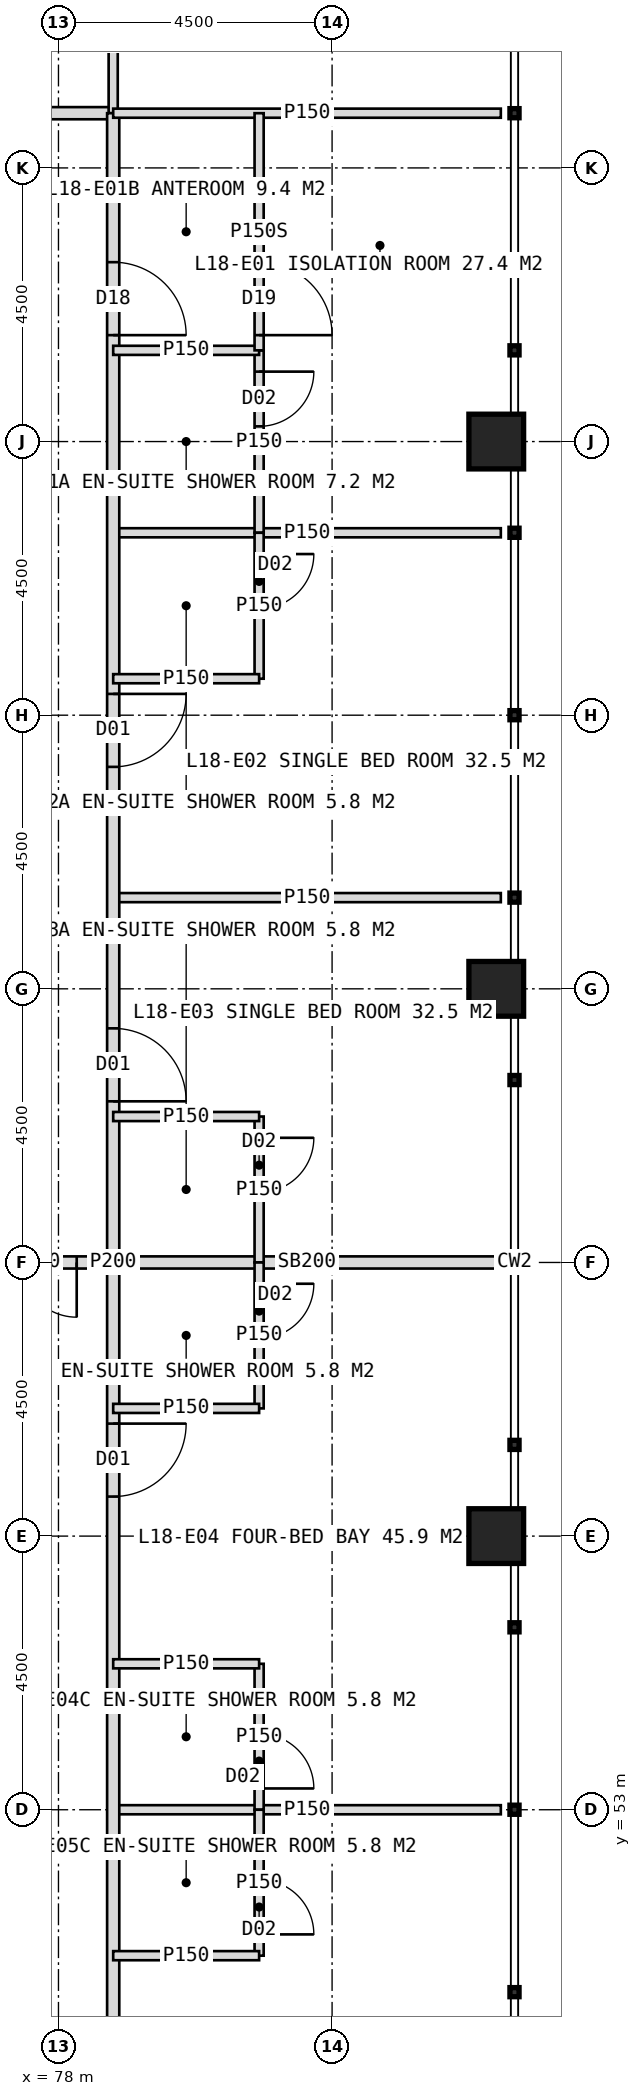
"""IFC4 building model, lengths in metres.
Left out: names, types, materials, properties, quantities, classifications, styles, units other than length and angle.
Written with IfcOpenShell. Run it as: python <this file> out.ifc"""

import sys

from ifc_helpers import new_model, si_unit, direction, frame, frame_2d, origin, origin_2d, place, context, subcontext, project, spatial, rectangle, hollow_rectangle, extrude, element, fill, save


model = new_model("IFC4")
c1 = context("Model", 3, precision=1e-05, world=origin(), true_north=direction((0.0, 1.0)))
c2 = subcontext(c1, "Body", "Model", "MODEL_VIEW")
j1 = project(units=[si_unit("LENGTHUNIT", "METRE"), si_unit("PLANEANGLEUNIT", "RADIAN")], contexts=[c1])
p1 = place(None, origin())
s1 = spatial("IfcSite", under=j1, at=p1, CompositionType="ELEMENT")
p2 = place(p1, origin())
s2 = spatial("IfcBuilding", under=s1, at=p2, CompositionType="ELEMENT")
p3 = place(p2, frame((0.0, 0.0, 79.0)))
s3 = spatial("IfcBuildingStorey", under=s2, at=p3, CompositionType="ELEMENT", Elevation=79.0)
for number, where, z_axis, x_axis in (
    (1, (85.2, 57.5, 0.0), (0.0, 0.0, 1.0), (1.0, 0.0, 0.0)),
    (2, (85.2, 66.5, 0.0), (0.0, 0.0, 1.0), (1.0, 0.0, 0.0)),
    (3, (85.2, 75.5, 0.0), (0.0, 0.0, 1.0), (1.0, 0.0, 0.0)),
):
    element("IfcColumn", number, at=place(p3, frame(where, z_axis=z_axis, x_axis=x_axis)), inside=s3, PredefinedType="COLUMN", context=c2, shape_type="SweptSolid", body=[
        extrude(hollow_rectangle(XDim=0.9, YDim=0.9, WallThickness=0.08, at=origin_2d()), origin(), (0.0, 0.0, 1.0), 4.0),
    ])
p4 = place(p3, frame((41.1, 80.9, 0.0), z_axis=(0.0, 0.0, 1.0), x_axis=(1.0, 0.0, 0.0)))
e4 = element("IfcWall", 4, at=p4, inside=s3, PredefinedType="PARTITIONING", context=c2, shape_type="SweptSolid", body=[
    extrude(rectangle(XDim=37.8, YDim=0.2, at=frame_2d((18.9, 0.0))), origin(), (0.0, 0.0, 1.0), 3.75),
])
p5 = place(p4, frame((5.85, 0.0, 0.0)))
e5 = element("IfcOpeningElement", 5, at=p5, cuts=e4, PredefinedType="OPENING", context=c2, shape_type="SweptSolid", body=[
    extrude(rectangle(XDim=1.2, YDim=2.2, at=frame_2d((0.6, 1.1))), frame((0.0, 0.11, 0.0), z_axis=(0.0, -1.0, 0.0), x_axis=(1.0, 0.0, 0.0)), (0.0, 0.0, 1.0), 0.22),
])
p6 = place(p4, frame((18.3, 0.0, 0.0)))
e6 = element("IfcOpeningElement", 6, at=p6, cuts=e4, PredefinedType="OPENING", context=c2, shape_type="SweptSolid", body=[
    extrude(rectangle(XDim=1.2, YDim=2.2, at=frame_2d((0.6, 1.1))), frame((0.0, 0.11, 0.0), z_axis=(0.0, -1.0, 0.0), x_axis=(1.0, 0.0, 0.0)), (0.0, 0.0, 1.0), 0.22),
])
p7 = place(p4, frame((33.95, 0.0, 0.0)))
e7 = element("IfcOpeningElement", 7, at=p7, cuts=e4, PredefinedType="OPENING", context=c2, shape_type="SweptSolid", body=[
    extrude(rectangle(XDim=1.2, YDim=2.2, at=frame_2d((0.6, 1.1))), frame((0.0, 0.11, 0.0), z_axis=(0.0, -1.0, 0.0), x_axis=(1.0, 0.0, 0.0)), (0.0, 0.0, 1.0), 0.22),
])
p8 = place(p3, frame((78.9, 80.9, 0.0), z_axis=(0.0, 0.0, 1.0), x_axis=(0.0, 1.0, 0.0)))
e8 = element("IfcWall", 8, at=p8, inside=s3, PredefinedType="PARTITIONING", context=c2, shape_type="SweptSolid", body=[
    extrude(rectangle(XDim=2.4, YDim=0.15, at=frame_2d((1.2, 0.0))), origin(), (0.0, 0.0, 1.0), 3.75),
])
for number, where, z_axis, x_axis in (
    (9, (78.9, 74.0, 0.0), (0.0, 0.0, 1.0), (1.0, 0.0, 0.0)),
    (10, (78.9, 68.0, 0.0), (0.0, 0.0, 1.0), (1.0, 0.0, 0.0)),
):
    element("IfcWall", number, at=place(p3, frame(where, z_axis=z_axis, x_axis=x_axis)), inside=s3, PredefinedType="PARTITIONING", context=c2, shape_type="SweptSolid", body=[
        extrude(rectangle(XDim=6.375, YDim=0.15, at=frame_2d((3.188, 0.0))), origin(), (0.0, 0.0, 1.0), 3.75),
    ])
p9 = place(p3, frame((78.9, 62.0, 0.0), z_axis=(0.0, 0.0, 1.0), x_axis=(1.0, 0.0, 0.0)))
e11 = element("IfcWall", 11, at=p9, inside=s3, PredefinedType="SOLIDWALL", context=c2, shape_type="SweptSolid", body=[
    extrude(rectangle(XDim=6.375, YDim=0.2, at=frame_2d((3.188, 0.0))), origin(), (0.0, 0.0, 1.0), 2.75),
])
p10 = place(p3, frame((78.9, 53.0, 0.0), z_axis=(0.0, 0.0, 1.0), x_axis=(1.0, 0.0, 0.0)))
e12 = element("IfcWall", 12, at=p10, inside=s3, PredefinedType="PARTITIONING", context=c2, shape_type="SweptSolid", body=[
    extrude(rectangle(XDim=6.375, YDim=0.15, at=frame_2d((3.188, 0.0))), origin(), (0.0, 0.0, 1.0), 3.75),
])
p11 = place(p3, frame((78.9, 80.9, 0.0), z_axis=(0.0, 0.0, 1.0), x_axis=(0.0, -1.0, 0.0)))
e13 = element("IfcWall", 13, at=p11, inside=s3, PredefinedType="PARTITIONING", context=c2, shape_type="SweptSolid", body=[
    extrude(rectangle(XDim=37.8, YDim=0.2, at=frame_2d((18.9, 0.0))), origin(), (0.0, 0.0, 1.0), 3.75),
])
p12 = place(p11, frame((2.45, 0.0, 0.0)))
e14 = element("IfcOpeningElement", 14, at=p12, cuts=e13, PredefinedType="OPENING", context=c2, shape_type="SweptSolid", body=[
    extrude(rectangle(XDim=1.2, YDim=2.2, at=frame_2d((0.6, 1.1))), frame((0.0, 0.11, 0.0), z_axis=(0.0, -1.0, 0.0), x_axis=(1.0, 0.0, 0.0)), (0.0, 0.0, 1.0), 0.22),
])
p13 = place(p11, frame((9.55, 0.0, 0.0)))
e15 = element("IfcOpeningElement", 15, at=p13, cuts=e13, PredefinedType="OPENING", context=c2, shape_type="SweptSolid", body=[
    extrude(rectangle(XDim=1.2, YDim=2.2, at=frame_2d((0.6, 1.1))), frame((0.0, 0.11, 0.0), z_axis=(0.0, -1.0, 0.0), x_axis=(1.0, 0.0, 0.0)), (0.0, 0.0, 1.0), 0.22),
])
p14 = place(p11, frame((15.05, 0.0, 0.0)))
e16 = element("IfcOpeningElement", 16, at=p14, cuts=e13, PredefinedType="OPENING", context=c2, shape_type="SweptSolid", body=[
    extrude(rectangle(XDim=1.2, YDim=2.2, at=frame_2d((0.6, 1.1))), frame((0.0, 0.11, 0.0), z_axis=(0.0, -1.0, 0.0), x_axis=(1.0, 0.0, 0.0)), (0.0, 0.0, 1.0), 0.22),
])
p15 = place(p11, frame((21.55, 0.0, 0.0)))
e17 = element("IfcOpeningElement", 17, at=p15, cuts=e13, PredefinedType="OPENING", context=c2, shape_type="SweptSolid", body=[
    extrude(rectangle(XDim=1.2, YDim=2.2, at=frame_2d((0.6, 1.1))), frame((0.0, 0.11, 0.0), z_axis=(0.0, -1.0, 0.0), x_axis=(1.0, 0.0, 0.0)), (0.0, 0.0, 1.0), 0.22),
])
p16 = place(p11, frame((33.95, 0.0, 0.0)))
e18 = element("IfcOpeningElement", 18, at=p16, cuts=e13, PredefinedType="OPENING", context=c2, shape_type="SweptSolid", body=[
    extrude(rectangle(XDim=1.2, YDim=2.2, at=frame_2d((0.6, 1.1))), frame((0.0, 0.11, 0.0), z_axis=(0.0, -1.0, 0.0), x_axis=(1.0, 0.0, 0.0)), (0.0, 0.0, 1.0), 0.22),
])
p17 = place(p3, frame((78.9, 80.9, 0.0), z_axis=(0.0, 0.0, 1.0), x_axis=(1.0, 0.0, 0.0)))
e19 = element("IfcWall", 19, at=p17, inside=s3, PredefinedType="PARTITIONING", context=c2, shape_type="SweptSolid", body=[
    extrude(rectangle(XDim=6.375, YDim=0.15, at=frame_2d((3.188, 0.0))), origin(), (0.0, 0.0, 1.0), 3.75),
])
p18 = place(p3, frame((81.3, 77.0, 0.0), z_axis=(0.0, 0.0, 1.0), x_axis=(0.0, -1.0, 0.0)))
e20 = element("IfcWall", 20, at=p18, inside=s3, PredefinedType="PARTITIONING", context=c2, shape_type="SweptSolid", body=[
    extrude(rectangle(XDim=3.0, YDim=0.15, at=frame_2d((1.5, 0.0))), origin(), (0.0, 0.0, 1.0), 3.75),
])
p19 = place(p18, frame((0.35, 0.0, 0.0)))
e21 = element("IfcOpeningElement", 21, at=p19, cuts=e20, PredefinedType="OPENING", context=c2, shape_type="SweptSolid", body=[
    extrude(rectangle(XDim=0.9, YDim=2.1, at=frame_2d((0.45, 1.05))), frame((0.0, 0.085, 0.0), z_axis=(0.0, -1.0, 0.0), x_axis=(1.0, 0.0, 0.0)), (0.0, 0.0, 1.0), 0.17),
])
p20 = place(p3, frame((78.9, 77.0, 0.0), z_axis=(0.0, 0.0, 1.0), x_axis=(1.0, 0.0, 0.0)))
e22 = element("IfcWall", 22, at=p20, inside=s3, PredefinedType="PARTITIONING", context=c2, shape_type="SweptSolid", body=[
    extrude(rectangle(XDim=2.4, YDim=0.15, at=frame_2d((1.2, 0.0))), origin(), (0.0, 0.0, 1.0), 3.75),
])
p21 = place(p3, frame((81.3, 80.9, 0.0), z_axis=(0.0, 0.0, 1.0), x_axis=(0.0, -1.0, 0.0)))
e23 = element("IfcWall", 23, at=p21, inside=s3, PredefinedType="PARTITIONING", context=c2, shape_type="SweptSolid", body=[
    extrude(rectangle(XDim=3.9, YDim=0.15, at=frame_2d((1.95, 0.0))), origin(), (0.0, 0.0, 1.0), 3.75),
])
p22 = place(p21, frame((2.45, 0.0, 0.0)))
e24 = element("IfcOpeningElement", 24, at=p22, cuts=e23, PredefinedType="OPENING", context=c2, shape_type="SweptSolid", body=[
    extrude(rectangle(XDim=1.2, YDim=2.2, at=frame_2d((0.6, 1.1))), frame((0.0, 0.085, 0.0), z_axis=(0.0, -1.0, 0.0), x_axis=(1.0, 0.0, 0.0)), (0.0, 0.0, 1.0), 0.17),
])
p23 = place(p3, frame((81.3, 74.0, 0.0), z_axis=(0.0, 0.0, 1.0), x_axis=(0.0, -1.0, 0.0)))
e25 = element("IfcWall", 25, at=p23, inside=s3, PredefinedType="PARTITIONING", context=c2, shape_type="SweptSolid", body=[
    extrude(rectangle(XDim=2.4, YDim=0.15, at=frame_2d((1.2, 0.0))), origin(), (0.0, 0.0, 1.0), 3.75),
])
p24 = place(p23, frame((0.35, 0.0, 0.0)))
e26 = element("IfcOpeningElement", 26, at=p24, cuts=e25, PredefinedType="OPENING", context=c2, shape_type="SweptSolid", body=[
    extrude(rectangle(XDim=0.9, YDim=2.1, at=frame_2d((0.45, 1.05))), frame((0.0, 0.085, 0.0), z_axis=(0.0, -1.0, 0.0), x_axis=(1.0, 0.0, 0.0)), (0.0, 0.0, 1.0), 0.17),
])
p25 = place(p3, frame((78.9, 71.6, 0.0), z_axis=(0.0, 0.0, 1.0), x_axis=(1.0, 0.0, 0.0)))
e27 = element("IfcWall", 27, at=p25, inside=s3, PredefinedType="PARTITIONING", context=c2, shape_type="SweptSolid", body=[
    extrude(rectangle(XDim=2.4, YDim=0.15, at=frame_2d((1.2, 0.0))), origin(), (0.0, 0.0, 1.0), 3.75),
])
p26 = place(p3, frame((81.3, 64.4, 0.0), z_axis=(0.0, 0.0, 1.0), x_axis=(0.0, -1.0, 0.0)))
e28 = element("IfcWall", 28, at=p26, inside=s3, PredefinedType="PARTITIONING", context=c2, shape_type="SweptSolid", body=[
    extrude(rectangle(XDim=2.4, YDim=0.15, at=frame_2d((1.2, 0.0))), origin(), (0.0, 0.0, 1.0), 3.75),
])
p27 = place(p26, frame((0.35, 0.0, 0.0)))
e29 = element("IfcOpeningElement", 29, at=p27, cuts=e28, PredefinedType="OPENING", context=c2, shape_type="SweptSolid", body=[
    extrude(rectangle(XDim=0.9, YDim=2.1, at=frame_2d((0.45, 1.05))), frame((0.0, 0.085, 0.0), z_axis=(0.0, -1.0, 0.0), x_axis=(1.0, 0.0, 0.0)), (0.0, 0.0, 1.0), 0.17),
])
p28 = place(p3, frame((78.9, 64.4, 0.0), z_axis=(0.0, 0.0, 1.0), x_axis=(1.0, 0.0, 0.0)))
e30 = element("IfcWall", 30, at=p28, inside=s3, PredefinedType="PARTITIONING", context=c2, shape_type="SweptSolid", body=[
    extrude(rectangle(XDim=2.4, YDim=0.15, at=frame_2d((1.2, 0.0))), origin(), (0.0, 0.0, 1.0), 3.75),
])
p29 = place(p3, frame((81.3, 62.0, 0.0), z_axis=(0.0, 0.0, 1.0), x_axis=(0.0, -1.0, 0.0)))
e31 = element("IfcWall", 31, at=p29, inside=s3, PredefinedType="PARTITIONING", context=c2, shape_type="SweptSolid", body=[
    extrude(rectangle(XDim=2.4, YDim=0.15, at=frame_2d((1.2, 0.0))), origin(), (0.0, 0.0, 1.0), 3.75),
])
p30 = place(p29, frame((0.35, 0.0, 0.0)))
e32 = element("IfcOpeningElement", 32, at=p30, cuts=e31, PredefinedType="OPENING", context=c2, shape_type="SweptSolid", body=[
    extrude(rectangle(XDim=0.9, YDim=2.1, at=frame_2d((0.45, 1.05))), frame((0.0, 0.085, 0.0), z_axis=(0.0, -1.0, 0.0), x_axis=(1.0, 0.0, 0.0)), (0.0, 0.0, 1.0), 0.17),
])
p31 = place(p3, frame((78.9, 59.6, 0.0), z_axis=(0.0, 0.0, 1.0), x_axis=(1.0, 0.0, 0.0)))
e33 = element("IfcWall", 33, at=p31, inside=s3, PredefinedType="PARTITIONING", context=c2, shape_type="SweptSolid", body=[
    extrude(rectangle(XDim=2.4, YDim=0.15, at=frame_2d((1.2, 0.0))), origin(), (0.0, 0.0, 1.0), 3.75),
])
p32 = place(p3, frame((81.3, 55.4, 0.0), z_axis=(0.0, 0.0, 1.0), x_axis=(0.0, -1.0, 0.0)))
e34 = element("IfcWall", 34, at=p32, inside=s3, PredefinedType="PARTITIONING", context=c2, shape_type="SweptSolid", body=[
    extrude(rectangle(XDim=2.4, YDim=0.15, at=frame_2d((1.2, 0.0))), origin(), (0.0, 0.0, 1.0), 3.75),
])
p33 = place(p32, frame((1.15, 0.0, 0.0)))
e35 = element("IfcOpeningElement", 35, at=p33, cuts=e34, PredefinedType="OPENING", context=c2, shape_type="SweptSolid", body=[
    extrude(rectangle(XDim=0.9, YDim=2.1, at=frame_2d((0.45, 1.05))), frame((0.0, 0.085, 0.0), z_axis=(0.0, -1.0, 0.0), x_axis=(1.0, 0.0, 0.0)), (0.0, 0.0, 1.0), 0.17),
])
p34 = place(p3, frame((78.9, 55.4, 0.0), z_axis=(0.0, 0.0, 1.0), x_axis=(1.0, 0.0, 0.0)))
e36 = element("IfcWall", 36, at=p34, inside=s3, PredefinedType="PARTITIONING", context=c2, shape_type="SweptSolid", body=[
    extrude(rectangle(XDim=2.4, YDim=0.15, at=frame_2d((1.2, 0.0))), origin(), (0.0, 0.0, 1.0), 3.75),
])
p35 = place(p3, frame((81.3, 53.0, 0.0), z_axis=(0.0, 0.0, 1.0), x_axis=(0.0, -1.0, 0.0)))
e37 = element("IfcWall", 37, at=p35, inside=s3, PredefinedType="PARTITIONING", context=c2, shape_type="SweptSolid", body=[
    extrude(rectangle(XDim=2.4, YDim=0.15, at=frame_2d((1.2, 0.0))), origin(), (0.0, 0.0, 1.0), 3.75),
])
p36 = place(p35, frame((1.15, 0.0, 0.0)))
e38 = element("IfcOpeningElement", 38, at=p36, cuts=e37, PredefinedType="OPENING", context=c2, shape_type="SweptSolid", body=[
    extrude(rectangle(XDim=0.9, YDim=2.1, at=frame_2d((0.45, 1.05))), frame((0.0, 0.085, 0.0), z_axis=(0.0, -1.0, 0.0), x_axis=(1.0, 0.0, 0.0)), (0.0, 0.0, 1.0), 0.17),
])
p37 = place(p3, frame((78.9, 50.6, 0.0), z_axis=(0.0, 0.0, 1.0), x_axis=(1.0, 0.0, 0.0)))
e39 = element("IfcWall", 39, at=p37, inside=s3, PredefinedType="PARTITIONING", context=c2, shape_type="SweptSolid", body=[
    extrude(rectangle(XDim=2.4, YDim=0.15, at=frame_2d((1.2, 0.0))), origin(), (0.0, 0.0, 1.0), 3.75),
])
p38 = place(p3, frame((76.2, 62.0, 0.0), z_axis=(0.0, 0.0, 1.0), x_axis=(1.0, 0.0, 0.0)))
e40 = element("IfcWall", 40, at=p38, inside=s3, PredefinedType="SOLIDWALL", context=c2, shape_type="SweptSolid", body=[
    extrude(rectangle(XDim=2.7, YDim=0.2, at=frame_2d((1.35, 0.0))), origin(), (0.0, 0.0, 1.0), 2.75),
])
p39 = place(p38, frame((0.3, 0.0, 0.0)))
e41 = element("IfcOpeningElement", 41, at=p39, cuts=e40, PredefinedType="OPENING", context=c2, shape_type="SweptSolid", body=[
    extrude(rectangle(XDim=1.8, YDim=2.2, at=frame_2d((0.9, 1.1))), frame((0.0, 0.11, 0.0), z_axis=(0.0, -1.0, 0.0), x_axis=(1.0, 0.0, 0.0)), (0.0, 0.0, 1.0), 0.22),
])
p40 = place(p22, origin())
e42 = element("IfcDoor", 42, at=p40, inside=s3, OperationType="SINGLE_SWING_RIGHT", PredefinedType="DOOR", context=c2, shape_type="SweptSolid", body=[
    extrude(rectangle(XDim=1.2, YDim=2.2, at=frame_2d((0.6, 1.1))), frame((0.0, 0.025, 0.0), z_axis=(0.0, -1.0, 0.0), x_axis=(1.0, 0.0, 0.0)), (0.0, 0.0, 1.0), 0.05),
])
fill(e24, e42)
p41 = place(p12, origin())
e43 = element("IfcDoor", 43, at=p41, inside=s3, OperationType="SINGLE_SWING_RIGHT", PredefinedType="DOOR", context=c2, shape_type="SweptSolid", body=[
    extrude(rectangle(XDim=1.2, YDim=2.2, at=frame_2d((0.6, 1.1))), frame((0.0, 0.025, 0.0), z_axis=(0.0, -1.0, 0.0), x_axis=(1.0, 0.0, 0.0)), (0.0, 0.0, 1.0), 0.05),
])
fill(e14, e43)
p42 = place(p19, origin())
e44 = element("IfcDoor", 44, at=p42, inside=s3, OperationType="SINGLE_SWING_LEFT", PredefinedType="DOOR", context=c2, shape_type="SweptSolid", body=[
    extrude(rectangle(XDim=0.9, YDim=2.1, at=frame_2d((0.45, 1.05))), frame((0.0, 0.025, 0.0), z_axis=(0.0, -1.0, 0.0), x_axis=(1.0, 0.0, 0.0)), (0.0, 0.0, 1.0), 0.05),
])
fill(e21, e44)
p43 = place(p13, origin())
e45 = element("IfcDoor", 45, at=p43, inside=s3, OperationType="SINGLE_SWING_LEFT", PredefinedType="DOOR", context=c2, shape_type="SweptSolid", body=[
    extrude(rectangle(XDim=1.2, YDim=2.2, at=frame_2d((0.6, 1.1))), frame((0.0, 0.025, 0.0), z_axis=(0.0, -1.0, 0.0), x_axis=(1.0, 0.0, 0.0)), (0.0, 0.0, 1.0), 0.05),
])
fill(e15, e45)
p44 = place(p24, origin())
e46 = element("IfcDoor", 46, at=p44, inside=s3, OperationType="SINGLE_SWING_LEFT", PredefinedType="DOOR", context=c2, shape_type="SweptSolid", body=[
    extrude(rectangle(XDim=0.9, YDim=2.1, at=frame_2d((0.45, 1.05))), frame((0.0, 0.025, 0.0), z_axis=(0.0, -1.0, 0.0), x_axis=(1.0, 0.0, 0.0)), (0.0, 0.0, 1.0), 0.05),
])
fill(e26, e46)
p45 = place(p14, origin())
e47 = element("IfcDoor", 47, at=p45, inside=s3, OperationType="SINGLE_SWING_RIGHT", PredefinedType="DOOR", context=c2, shape_type="SweptSolid", body=[
    extrude(rectangle(XDim=1.2, YDim=2.2, at=frame_2d((0.6, 1.1))), frame((0.0, 0.025, 0.0), z_axis=(0.0, -1.0, 0.0), x_axis=(1.0, 0.0, 0.0)), (0.0, 0.0, 1.0), 0.05),
])
fill(e16, e47)
p46 = place(p27, origin())
e48 = element("IfcDoor", 48, at=p46, inside=s3, OperationType="SINGLE_SWING_LEFT", PredefinedType="DOOR", context=c2, shape_type="SweptSolid", body=[
    extrude(rectangle(XDim=0.9, YDim=2.1, at=frame_2d((0.45, 1.05))), frame((0.0, 0.025, 0.0), z_axis=(0.0, -1.0, 0.0), x_axis=(1.0, 0.0, 0.0)), (0.0, 0.0, 1.0), 0.05),
])
fill(e29, e48)
p47 = place(p15, origin())
e49 = element("IfcDoor", 49, at=p47, inside=s3, OperationType="SINGLE_SWING_LEFT", PredefinedType="DOOR", context=c2, shape_type="SweptSolid", body=[
    extrude(rectangle(XDim=1.2, YDim=2.2, at=frame_2d((0.6, 1.1))), frame((0.0, 0.025, 0.0), z_axis=(0.0, -1.0, 0.0), x_axis=(1.0, 0.0, 0.0)), (0.0, 0.0, 1.0), 0.05),
])
fill(e17, e49)
p48 = place(p30, origin())
e50 = element("IfcDoor", 50, at=p48, inside=s3, OperationType="SINGLE_SWING_LEFT", PredefinedType="DOOR", context=c2, shape_type="SweptSolid", body=[
    extrude(rectangle(XDim=0.9, YDim=2.1, at=frame_2d((0.45, 1.05))), frame((0.0, 0.025, 0.0), z_axis=(0.0, -1.0, 0.0), x_axis=(1.0, 0.0, 0.0)), (0.0, 0.0, 1.0), 0.05),
])
fill(e32, e50)
p49 = place(p33, origin())
e51 = element("IfcDoor", 51, at=p49, inside=s3, OperationType="SINGLE_SWING_RIGHT", PredefinedType="DOOR", context=c2, shape_type="SweptSolid", body=[
    extrude(rectangle(XDim=0.9, YDim=2.1, at=frame_2d((0.45, 1.05))), frame((0.0, 0.025, 0.0), z_axis=(0.0, -1.0, 0.0), x_axis=(1.0, 0.0, 0.0)), (0.0, 0.0, 1.0), 0.05),
])
fill(e35, e51)
p50 = place(p36, origin())
e52 = element("IfcDoor", 52, at=p50, inside=s3, OperationType="SINGLE_SWING_RIGHT", PredefinedType="DOOR", context=c2, shape_type="SweptSolid", body=[
    extrude(rectangle(XDim=0.9, YDim=2.1, at=frame_2d((0.45, 1.05))), frame((0.0, 0.025, 0.0), z_axis=(0.0, -1.0, 0.0), x_axis=(1.0, 0.0, 0.0)), (0.0, 0.0, 1.0), 0.05),
])
fill(e38, e52)
p51 = place(p39, origin())
e53 = element("IfcDoor", 53, at=p51, inside=s3, OperationType="DOUBLE_DOOR_DOUBLE_SWING", PredefinedType="DOOR", context=c2, shape_type="SweptSolid", body=[
    extrude(rectangle(XDim=1.8, YDim=2.2, at=frame_2d((0.9, 1.1))), frame((0.0, 0.025, 0.0), z_axis=(0.0, -1.0, 0.0), x_axis=(1.0, 0.0, 0.0)), (0.0, 0.0, 1.0), 0.05),
])
fill(e41, e53)
save(model, sys.argv[1])
